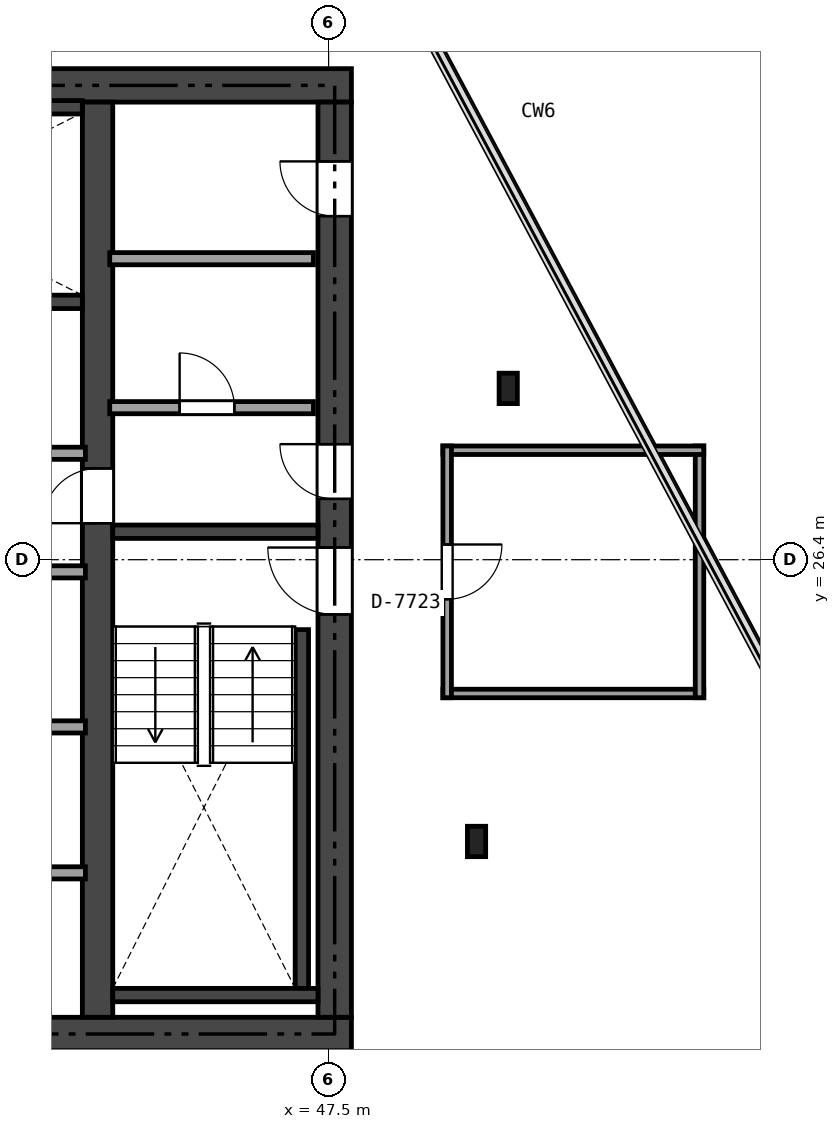
"""IFC4 building model, lengths in metres.
Left out: names, types, materials, properties, quantities, classifications, styles, units other than length and angle.
Written with IfcOpenShell. Run it as: python <this file> out.ifc"""

import sys

from ifc_helpers import new_model, si_unit, direction, frame, frame_2d, origin, origin_2d, place, context, subcontext, project, spatial, rectangle, i_section, extrude, element, fill, save


model = new_model("IFC4")
c1 = context("Model", 3, precision=1e-05, world=origin(), true_north=direction((0.0, 1.0)))
c2 = subcontext(c1, "Body", "Model", "MODEL_VIEW")
j1 = project(units=[si_unit("LENGTHUNIT", "METRE"), si_unit("PLANEANGLEUNIT", "RADIAN")], contexts=[c1])
p1 = place(None, origin())
s1 = spatial("IfcSite", under=j1, at=p1, CompositionType="ELEMENT")
p2 = place(p1, origin())
s2 = spatial("IfcBuilding", under=s1, at=p2, CompositionType="ELEMENT")
p3 = place(p2, frame((0.0, 0.0, 286.7)))
s3 = spatial("IfcBuildingStorey", under=s2, at=p3, CompositionType="ELEMENT", Elevation=286.7)
p4 = place(p3, frame((26.525, 18.6, 0.0), z_axis=(0.0, 0.0, 1.0), x_axis=(1.0, 0.0, 0.0)))
e1 = element("IfcWall", 1, at=p4, inside=s3, PredefinedType="SHEAR", context=c2, shape_type="SweptSolid", body=[
    extrude(rectangle(XDim=21.35, YDim=0.55, at=frame_2d((10.675, 0.0))), origin(), (0.0, 0.0, 1.0), 2.78),
])
p5 = place(p4, frame((12.4, 0.0, 0.0)))
e2 = element("IfcOpeningElement", 2, at=p5, cuts=e1, PredefinedType="OPENING", context=c2, shape_type="SweptSolid", body=[
    extrude(rectangle(XDim=1.15, YDim=2.15, at=frame_2d((0.575, 1.075))), frame((0.0, 0.285, 0.0), z_axis=(0.0, -1.0, 0.0), x_axis=(1.0, 0.0, 0.0)), (0.0, 0.0, 1.0), 0.57),
])
p6 = place(p4, frame((5.225, 0.0, 0.0)))
e3 = element("IfcOpeningElement", 3, at=p6, cuts=e1, PredefinedType="OPENING", context=c2, shape_type="SweptSolid", body=[
    extrude(rectangle(XDim=0.9, YDim=2.1, at=frame_2d((0.45, 1.05))), frame((0.0, 0.285, 0.0), z_axis=(0.0, -1.0, 0.0), x_axis=(1.0, 0.0, 0.0)), (0.0, 0.0, 1.0), 0.57),
])
p7 = place(p3, frame((26.525, 34.2, 0.0), z_axis=(0.0, 0.0, 1.0), x_axis=(1.0, 0.0, 0.0)))
e4 = element("IfcWall", 4, at=p7, inside=s3, PredefinedType="SHEAR", context=c2, shape_type="SweptSolid", body=[
    extrude(rectangle(XDim=21.35, YDim=0.55, at=frame_2d((10.675, 0.0))), origin(), (0.0, 0.0, 1.0), 2.78),
])
p8 = place(p7, frame((9.675, 0.0, 0.0)))
e5 = element("IfcOpeningElement", 5, at=p8, cuts=e4, PredefinedType="OPENING", context=c2, shape_type="SweptSolid", body=[
    extrude(rectangle(XDim=1.1, YDim=2.15, at=frame_2d((0.55, 1.075))), frame((0.0, 0.285, 0.0), z_axis=(0.0, -1.0, 0.0), x_axis=(1.0, 0.0, 0.0)), (0.0, 0.0, 1.0), 0.57),
])
p9 = place(p7, frame((1.925, 0.0, 0.0)))
e6 = element("IfcOpeningElement", 6, at=p9, cuts=e4, PredefinedType="OPENING", context=c2, shape_type="SweptSolid", body=[
    extrude(rectangle(XDim=0.9, YDim=2.1, at=frame_2d((0.45, 1.05))), frame((0.0, 0.285, 0.0), z_axis=(0.0, -1.0, 0.0), x_axis=(1.0, 0.0, 0.0)), (0.0, 0.0, 1.0), 0.57),
])
p10 = place(p7, frame((6.225, 0.0, 0.0)))
e7 = element("IfcOpeningElement", 7, at=p10, cuts=e4, PredefinedType="OPENING", context=c2, shape_type="SweptSolid", body=[
    extrude(rectangle(XDim=0.9, YDim=2.1, at=frame_2d((0.45, 1.05))), frame((0.0, 0.285, 0.0), z_axis=(0.0, -1.0, 0.0), x_axis=(1.0, 0.0, 0.0)), (0.0, 0.0, 1.0), 0.57),
])
p11 = place(p3, frame((47.6, 18.875, 0.0), z_axis=(0.0, 0.0, 1.0), x_axis=(0.0, 1.0, 0.0)))
e8 = element("IfcWall", 8, at=p11, inside=s3, PredefinedType="SHEAR", context=c2, shape_type="SweptSolid", body=[
    extrude(rectangle(XDim=15.05, YDim=0.55, at=frame_2d((7.525, 0.0))), origin(), (0.0, 0.0, 1.0), 2.78),
])
p12 = place(p11, frame((6.625, 0.0, 0.0)))
e9 = element("IfcOpeningElement", 9, at=p12, cuts=e8, PredefinedType="OPENING", context=c2, shape_type="SweptSolid", body=[
    extrude(rectangle(XDim=1.1, YDim=2.15, at=frame_2d((0.55, 1.075))), frame((0.0, 0.285, 0.0), z_axis=(0.0, -1.0, 0.0), x_axis=(1.0, 0.0, 0.0)), (0.0, 0.0, 1.0), 0.57),
])
p13 = place(p11, frame((8.525, 0.0, 0.0)))
e10 = element("IfcOpeningElement", 10, at=p13, cuts=e8, PredefinedType="OPENING", context=c2, shape_type="SweptSolid", body=[
    extrude(rectangle(XDim=0.9, YDim=2.1, at=frame_2d((0.45, 1.05))), frame((0.0, 0.285, 0.0), z_axis=(0.0, -1.0, 0.0), x_axis=(1.0, 0.0, 0.0)), (0.0, 0.0, 1.0), 0.57),
])
p14 = place(p11, frame((13.175, 0.0, 0.0)))
e11 = element("IfcOpeningElement", 11, at=p14, cuts=e8, PredefinedType="OPENING", context=c2, shape_type="SweptSolid", body=[
    extrude(rectangle(XDim=0.9, YDim=2.1, at=frame_2d((0.45, 1.05))), frame((0.0, 0.285, 0.0), z_axis=(0.0, -1.0, 0.0), x_axis=(1.0, 0.0, 0.0)), (0.0, 0.0, 1.0), 0.57),
])
p15 = place(p3, frame((43.7, 18.875, 0.0), z_axis=(0.0, 0.0, 1.0), x_axis=(0.0, 1.0, 0.0)))
e12 = element("IfcWall", 12, at=p15, inside=s3, PredefinedType="SHEAR", context=c2, shape_type="SweptSolid", body=[
    extrude(rectangle(XDim=15.05, YDim=0.5, at=frame_2d((7.525, 0.0))), origin(), (0.0, 0.0, 1.0), 2.78),
])
p16 = place(p15, frame((8.125, 0.0, 0.0)))
e13 = element("IfcOpeningElement", 13, at=p16, cuts=e12, PredefinedType="OPENING", context=c2, shape_type="SweptSolid", body=[
    extrude(rectangle(XDim=0.9, YDim=2.1, at=frame_2d((0.45, 1.05))), frame((0.0, 0.26, 0.0), z_axis=(0.0, -1.0, 0.0), x_axis=(1.0, 0.0, 0.0)), (0.0, 0.0, 1.0), 0.52),
])
p17 = place(p3, frame((43.95, 26.86, 0.0), z_axis=(0.0, 0.0, 1.0), x_axis=(1.0, 0.0, 0.0)))
e14 = element("IfcWall", 14, at=p17, inside=s3, PredefinedType="SHEAR", context=c2, shape_type="SweptSolid", body=[
    extrude(rectangle(XDim=3.375, YDim=0.22, at=frame_2d((1.688, 0.0))), origin(), (0.0, 0.0, 1.0), 2.78),
])
p18 = place(p3, frame((47.06, 19.35, 0.0), z_axis=(0.0, 0.0, 1.0), x_axis=(0.0, 1.0, 0.0)))
e15 = element("IfcWall", 15, at=p18, inside=s3, PredefinedType="SHEAR", context=c2, shape_type="SweptSolid", body=[
    extrude(rectangle(XDim=5.9, YDim=0.22, at=frame_2d((2.95, 0.0))), origin(), (0.0, 0.0, 1.0), 2.78),
])
p19 = place(p3, frame((43.95, 19.24, 0.0), z_axis=(0.0, 0.0, 1.0), x_axis=(1.0, 0.0, 0.0)))
e16 = element("IfcWall", 16, at=p19, inside=s3, PredefinedType="SHEAR", context=c2, shape_type="SweptSolid", body=[
    extrude(rectangle(XDim=3.375, YDim=0.22, at=frame_2d((1.688, 0.0))), origin(), (0.0, 0.0, 1.0), 2.78),
])
p20 = place(p3, frame((35.84, 30.64, 0.0), z_axis=(0.0, 0.0, 1.0), x_axis=(1.0, 0.0, 0.0)))
e17 = element("IfcWall", 17, at=p20, inside=s3, PredefinedType="SHEAR", context=c2, shape_type="SweptSolid", body=[
    extrude(rectangle(XDim=7.61, YDim=0.22, at=frame_2d((3.805, 0.0))), origin(), (0.0, 0.0, 1.0), 2.78),
])
p21 = place(p3, frame((37.55, 33.84, 0.0), z_axis=(0.0, 0.0, 1.0), x_axis=(1.0, 0.0, 0.0)))
e18 = element("IfcWall", 18, at=p21, inside=s3, PredefinedType="SHEAR", context=c2, shape_type="SweptSolid", body=[
    extrude(rectangle(XDim=5.9, YDim=0.22, at=frame_2d((2.95, 0.0))), origin(), (0.0, 0.0, 1.0), 2.78),
])
for number, where, z_axis, x_axis in (
    (19, (50.454, 29.217, 0.0), (0.0, 0.0, 1.0), (1.0, 0.0, 0.0)),
    (20, (49.933, 21.766, 0.0), (0.0, 0.0, 1.0), (1.0, 0.0, 0.0)),
):
    element("IfcColumn", number, at=place(p3, frame(where, z_axis=z_axis, x_axis=x_axis)), inside=s3, PredefinedType="COLUMN", context=c2, shape_type="SweptSolid", body=[
        extrude(i_section(OverallWidth=0.3, OverallDepth=0.5, WebThickness=0.015, FlangeThickness=0.028, at=origin_2d()), origin(), (0.0, 0.0, 1.0), 2.78),
    ])
p22 = place(p3, frame((43.9, 28.9, 0.0), z_axis=(0.0, 0.0, 1.0), x_axis=(1.0, 0.0, 0.0)))
e21 = element("IfcWall", 21, at=p22, inside=s3, PredefinedType="SOLIDWALL", context=c2, shape_type="SweptSolid", body=[
    extrude(rectangle(XDim=3.35, YDim=0.2, at=frame_2d((1.675, 0.0))), origin(), (0.0, 0.0, 1.0), 2.78),
])
p23 = place(p22, frame((1.15, 0.0, 0.0)))
e22 = element("IfcOpeningElement", 22, at=p23, cuts=e21, PredefinedType="OPENING", context=c2, shape_type="SweptSolid", body=[
    extrude(rectangle(XDim=0.9, YDim=2.1, at=frame_2d((0.45, 1.05))), frame((0.0, 0.11, 0.0), z_axis=(0.0, -1.0, 0.0), x_axis=(1.0, 0.0, 0.0)), (0.0, 0.0, 1.0), 0.22),
])
p24 = place(p3, frame((43.9, 31.35, 0.0), z_axis=(0.0, 0.0, 1.0), x_axis=(1.0, 0.0, 0.0)))
e23 = element("IfcWall", 23, at=p24, inside=s3, PredefinedType="SOLIDWALL", context=c2, shape_type="SweptSolid", body=[
    extrude(rectangle(XDim=3.35, YDim=0.2, at=frame_2d((1.675, 0.0))), origin(), (0.0, 0.0, 1.0), 2.78),
])
p25 = place(p3, frame((35.62, 28.15, 0.0), z_axis=(0.0, 0.0, 1.0), x_axis=(1.0, 0.0, 0.0)))
e24 = element("IfcWall", 24, at=p25, inside=s3, PredefinedType="SOLIDWALL", context=c2, shape_type="SweptSolid", body=[
    extrude(rectangle(XDim=7.88, YDim=0.2, at=frame_2d((3.94, 0.0))), origin(), (0.0, 0.0, 1.0), 2.78),
])
p26 = place(p25, frame((1.13, 0.0, 0.0)))
e25 = element("IfcOpeningElement", 25, at=p26, cuts=e24, PredefinedType="OPENING", context=c2, shape_type="SweptSolid", body=[
    extrude(rectangle(XDim=0.9, YDim=2.1, at=frame_2d((0.45, 1.05))), frame((0.0, 0.11, 0.0), z_axis=(0.0, -1.0, 0.0), x_axis=(1.0, 0.0, 0.0)), (0.0, 0.0, 1.0), 0.22),
])
p27 = place(p25, frame((5.73, 0.0, 0.0)))
e26 = element("IfcOpeningElement", 26, at=p27, cuts=e24, PredefinedType="OPENING", context=c2, shape_type="SweptSolid", body=[
    extrude(rectangle(XDim=0.9, YDim=2.1, at=frame_2d((0.45, 1.05))), frame((0.0, 0.11, 0.0), z_axis=(0.0, -1.0, 0.0), x_axis=(1.0, 0.0, 0.0)), (0.0, 0.0, 1.0), 0.22),
])
p28 = place(p3, frame((35.62, 26.2, 0.0), z_axis=(0.0, 0.0, 1.0), x_axis=(1.0, 0.0, 0.0)))
e27 = element("IfcWall", 27, at=p28, inside=s3, PredefinedType="SOLIDWALL", context=c2, shape_type="SweptSolid", body=[
    extrude(rectangle(XDim=7.88, YDim=0.2, at=frame_2d((3.94, 0.0))), origin(), (0.0, 0.0, 1.0), 2.78),
])
p29 = place(p28, frame((1.13, 0.0, 0.0)))
e28 = element("IfcOpeningElement", 28, at=p29, cuts=e27, PredefinedType="OPENING", context=c2, shape_type="SweptSolid", body=[
    extrude(rectangle(XDim=0.9, YDim=2.1, at=frame_2d((0.45, 1.05))), frame((0.0, 0.11, 0.0), z_axis=(0.0, -1.0, 0.0), x_axis=(1.0, 0.0, 0.0)), (0.0, 0.0, 1.0), 0.22),
])
p30 = place(p28, frame((5.73, 0.0, 0.0)))
e29 = element("IfcOpeningElement", 29, at=p30, cuts=e27, PredefinedType="OPENING", context=c2, shape_type="SweptSolid", body=[
    extrude(rectangle(XDim=0.9, YDim=2.1, at=frame_2d((0.45, 1.05))), frame((0.0, 0.11, 0.0), z_axis=(0.0, -1.0, 0.0), x_axis=(1.0, 0.0, 0.0)), (0.0, 0.0, 1.0), 0.22),
])
p31 = place(p3, frame((35.62, 23.65, 0.0), z_axis=(0.0, 0.0, 1.0), x_axis=(1.0, 0.0, 0.0)))
e30 = element("IfcWall", 30, at=p31, inside=s3, PredefinedType="SOLIDWALL", context=c2, shape_type="SweptSolid", body=[
    extrude(rectangle(XDim=7.88, YDim=0.2, at=frame_2d((3.94, 0.0))), origin(), (0.0, 0.0, 1.0), 2.301),
])
p32 = place(p3, frame((35.62, 21.25, 0.0), z_axis=(0.0, 0.0, 1.0), x_axis=(1.0, 0.0, 0.0)))
e31 = element("IfcWall", 31, at=p32, inside=s3, PredefinedType="SOLIDWALL", context=c2, shape_type="SweptSolid", body=[
    extrude(rectangle(XDim=7.88, YDim=0.2, at=frame_2d((3.94, 0.0))), origin(), (0.0, 0.0, 1.0), 2.78),
])
p33 = place(p32, frame((1.13, 0.0, 0.0)))
e32 = element("IfcOpeningElement", 32, at=p33, cuts=e31, PredefinedType="OPENING", context=c2, shape_type="SweptSolid", body=[
    extrude(rectangle(XDim=0.9, YDim=2.1, at=frame_2d((0.45, 1.05))), frame((0.0, 0.11, 0.0), z_axis=(0.0, -1.0, 0.0), x_axis=(1.0, 0.0, 0.0)), (0.0, 0.0, 1.0), 0.22),
])
p34 = place(p32, frame((5.73, 0.0, 0.0)))
e33 = element("IfcOpeningElement", 33, at=p34, cuts=e31, PredefinedType="OPENING", context=c2, shape_type="SweptSolid", body=[
    extrude(rectangle(XDim=0.9, YDim=2.1, at=frame_2d((0.45, 1.05))), frame((0.0, 0.11, 0.0), z_axis=(0.0, -1.0, 0.0), x_axis=(1.0, 0.0, 0.0)), (0.0, 0.0, 1.0), 0.22),
])
p35 = place(p3, frame((49.38, 24.2, 0.0), z_axis=(0.0, 0.0, 1.0), x_axis=(1.0, 0.0, 0.0)))
e34 = element("IfcWall", 34, at=p35, inside=s3, PredefinedType="PARTITIONING", context=c2, shape_type="SweptSolid", body=[
    extrude(rectangle(XDim=4.29, YDim=0.14, at=frame_2d((2.145, 0.0))), origin(), (0.0, 0.0, 1.0), 2.305),
])
p36 = place(p3, frame((53.6, 24.13, 0.0), z_axis=(0.0, 0.0, 1.0), x_axis=(0.0, 1.0, 0.0)))
e35 = element("IfcWall", 35, at=p36, inside=s3, PredefinedType="PARTITIONING", context=c2, shape_type="SweptSolid", body=[
    extrude(rectangle(XDim=4.14, YDim=0.14, at=frame_2d((2.07, 0.0))), origin(), (0.0, 0.0, 1.0), 2.78),
])
p37 = place(p3, frame((53.67, 28.2, 0.0), z_axis=(0.0, 0.0, 1.0), x_axis=(-1.0, 0.0, 0.0)))
e36 = element("IfcWall", 36, at=p37, inside=s3, PredefinedType="PARTITIONING", context=c2, shape_type="SweptSolid", body=[
    extrude(rectangle(XDim=4.29, YDim=0.14, at=frame_2d((2.145, 0.0))), origin(), (0.0, 0.0, 1.0), 2.305),
])
p38 = place(p3, frame((49.45, 28.27, 0.0), z_axis=(0.0, 0.0, 1.0), x_axis=(0.0, -1.0, 0.0)))
e37 = element("IfcWall", 37, at=p38, inside=s3, PredefinedType="PARTITIONING", context=c2, shape_type="SweptSolid", body=[
    extrude(rectangle(XDim=4.14, YDim=0.14, at=frame_2d((2.07, 0.0))), origin(), (0.0, 0.0, 1.0), 2.78),
])
p39 = place(p38, frame((1.62, 0.0, 0.0)))
e38 = element("IfcOpeningElement", 38, at=p39, cuts=e37, PredefinedType="OPENING", context=c2, shape_type="SweptSolid", body=[
    extrude(rectangle(XDim=0.9, YDim=2.0, at=frame_2d((0.45, 1.0))), frame((0.0, 0.08, 0.0), z_axis=(0.0, -1.0, 0.0), x_axis=(1.0, 0.0, 0.0)), (0.0, 0.0, 1.0), 0.16),
])
p40 = place(p12, origin())
e39 = element("IfcDoor", 39, at=p40, inside=s3, OperationType="SINGLE_SWING_RIGHT", PredefinedType="DOOR", context=c2, shape_type="SweptSolid", body=[
    extrude(rectangle(XDim=1.1, YDim=2.15, at=frame_2d((0.55, 1.075))), frame((0.0, 0.025, 0.0), z_axis=(0.0, -1.0, 0.0), x_axis=(1.0, 0.0, 0.0)), (0.0, 0.0, 1.0), 0.05),
])
fill(e9, e39)
p41 = place(p16, origin())
e40 = element("IfcDoor", 40, at=p41, inside=s3, OperationType="SINGLE_SWING_LEFT", PredefinedType="DOOR", context=c2, shape_type="SweptSolid", body=[
    extrude(rectangle(XDim=0.9, YDim=2.1, at=frame_2d((0.45, 1.05))), frame((0.0, 0.025, 0.0), z_axis=(0.0, -1.0, 0.0), x_axis=(1.0, 0.0, 0.0)), (0.0, 0.0, 1.0), 0.05),
])
fill(e13, e40)
p42 = place(p13, origin())
e41 = element("IfcDoor", 41, at=p42, inside=s3, OperationType="SINGLE_SWING_RIGHT", PredefinedType="DOOR", context=c2, shape_type="SweptSolid", body=[
    extrude(rectangle(XDim=0.9, YDim=2.1, at=frame_2d((0.45, 1.05))), frame((0.0, 0.025, 0.0), z_axis=(0.0, -1.0, 0.0), x_axis=(1.0, 0.0, 0.0)), (0.0, 0.0, 1.0), 0.05),
])
fill(e10, e41)
p43 = place(p23, origin())
e42 = element("IfcDoor", 42, at=p43, inside=s3, OperationType="SINGLE_SWING_LEFT", PredefinedType="DOOR", context=c2, shape_type="SweptSolid", body=[
    extrude(rectangle(XDim=0.9, YDim=2.1, at=frame_2d((0.45, 1.05))), frame((0.0, 0.025, 0.0), z_axis=(0.0, -1.0, 0.0), x_axis=(1.0, 0.0, 0.0)), (0.0, 0.0, 1.0), 0.05),
])
fill(e22, e42)
p44 = place(p14, origin())
e43 = element("IfcDoor", 43, at=p44, inside=s3, OperationType="SINGLE_SWING_RIGHT", PredefinedType="DOOR", context=c2, shape_type="SweptSolid", body=[
    extrude(rectangle(XDim=0.9, YDim=2.1, at=frame_2d((0.45, 1.05))), frame((0.0, 0.025, 0.0), z_axis=(0.0, -1.0, 0.0), x_axis=(1.0, 0.0, 0.0)), (0.0, 0.0, 1.0), 0.05),
])
fill(e11, e43)
p45 = place(p39, origin())
e44 = element("IfcDoor", 44, at=p45, inside=s3, OperationType="SINGLE_SWING_LEFT", PredefinedType="DOOR", context=c2, shape_type="SweptSolid", body=[
    extrude(rectangle(XDim=0.9, YDim=2.0, at=frame_2d((0.45, 1.0))), frame((0.0, 0.025, 0.0), z_axis=(0.0, -1.0, 0.0), x_axis=(1.0, 0.0, 0.0)), (0.0, 0.0, 1.0), 0.05),
])
fill(e38, e44)
save(model, sys.argv[1])
